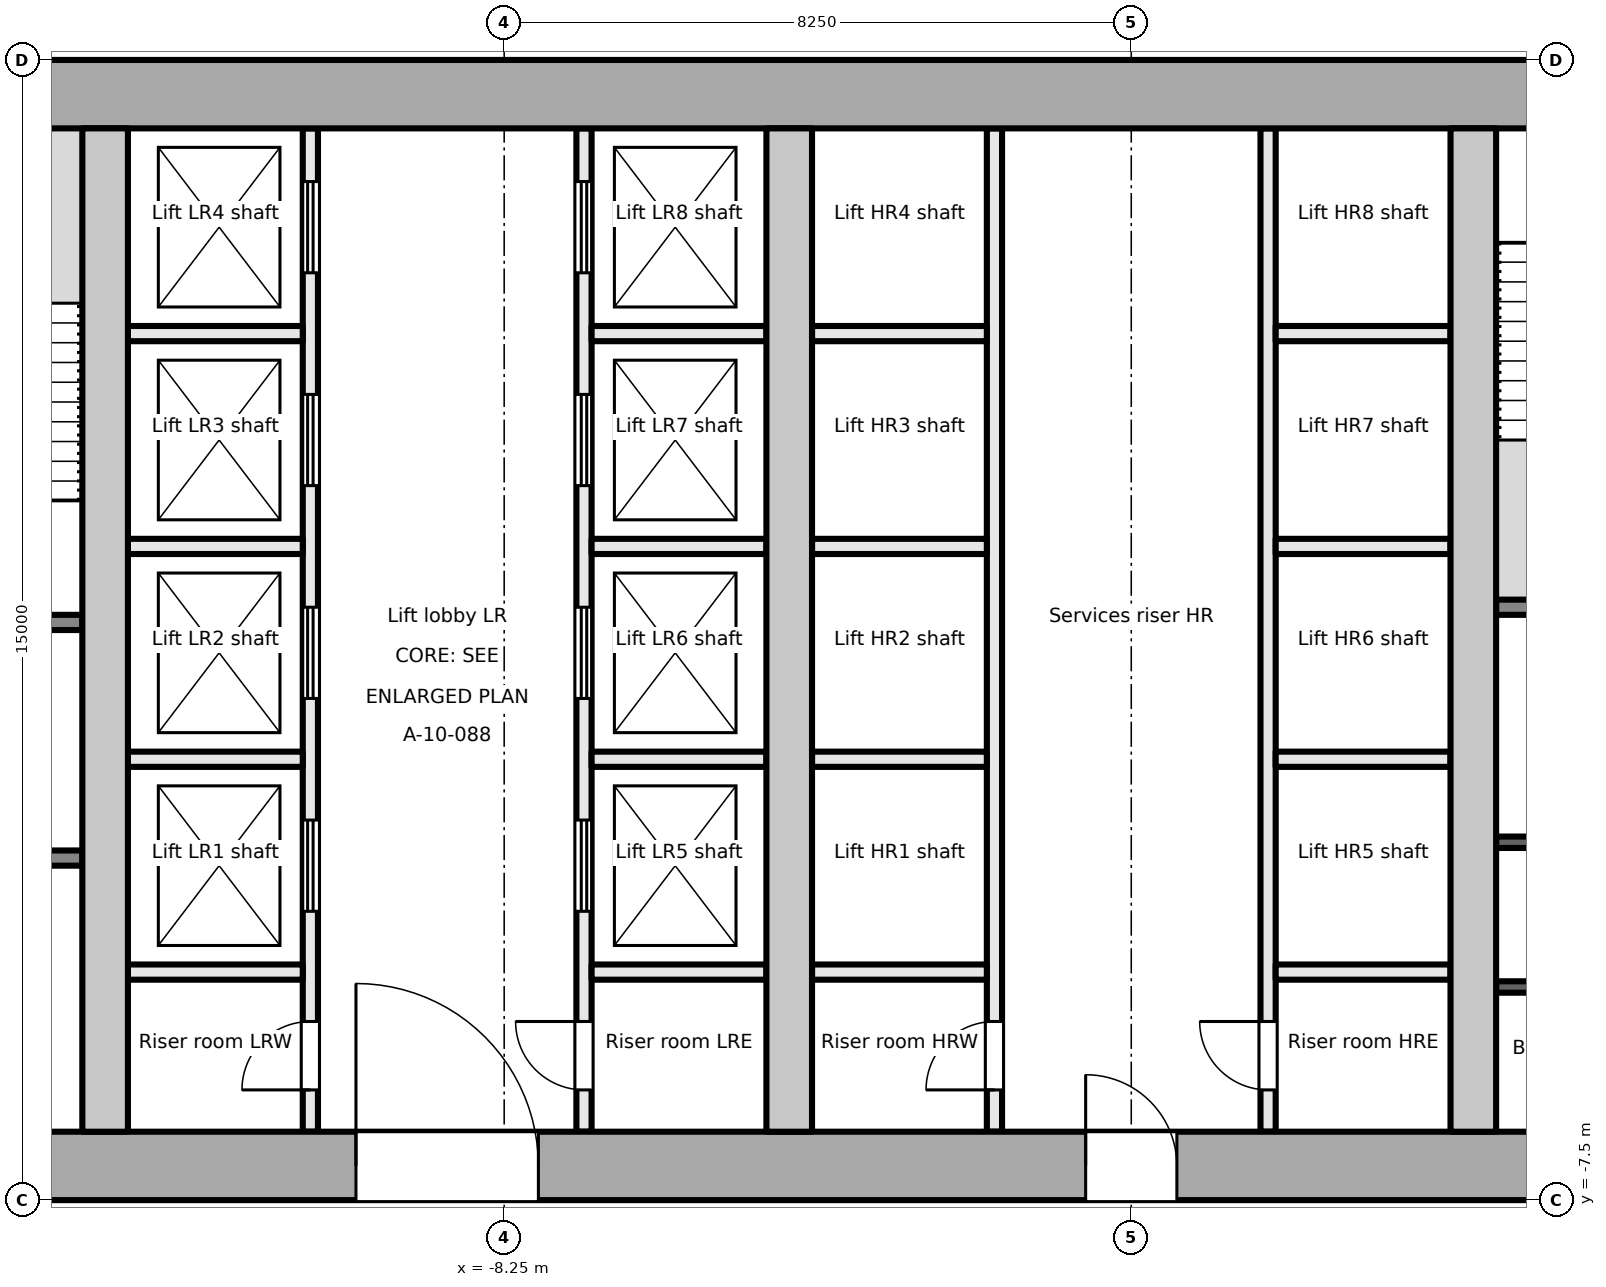
"""IFC4 building model, lengths in metres.
Left out: names, types, materials, properties, quantities, classifications, styles, units other than length and angle.
Written with IfcOpenShell. Run it as: python <this file> out.ifc"""

import sys

from ifc_helpers import new_model, si_unit, direction, frame, frame_2d, origin, place, context, subcontext, project, spatial, rectangle, extrude, element, fill, save


model = new_model("IFC4")
c1 = context("Model", 3, precision=1e-05, world=origin(), true_north=direction((0.0, 1.0)))
c2 = subcontext(c1, "Body", "Model", "MODEL_VIEW")
j1 = project(units=[si_unit("LENGTHUNIT", "METRE"), si_unit("PLANEANGLEUNIT", "RADIAN")], contexts=[c1])
p1 = place(None, origin())
s1 = spatial("IfcSite", under=j1, at=p1, CompositionType="ELEMENT")
p2 = place(p1, origin())
s2 = spatial("IfcBuilding", under=s1, at=p2, CompositionType="ELEMENT")
p3 = place(p2, frame((0.0, 0.0, 52.9)))
s3 = spatial("IfcBuildingStorey", under=s2, at=p3, CompositionType="ELEMENT", Elevation=52.9)
p4 = place(p3, frame((-18.0, -7.05, -0.2), z_axis=(0.0, 0.0, 1.0), x_axis=(1.0, 0.0, 0.0)))
e1 = element("IfcWall", 1, at=p4, inside=s3, PredefinedType="SHEAR", context=c2, shape_type="SweptSolid", body=[
    extrude(rectangle(XDim=36.0, YDim=0.9, at=frame_2d((18.0, 0.0))), origin(), (0.0, 0.0, 1.0), 4.1),
])
p5 = place(p4, frame((7.8, 0.0, 0.2)))
e2 = element("IfcOpeningElement", 2, at=p5, cuts=e1, PredefinedType="OPENING", context=c2, shape_type="SweptSolid", body=[
    extrude(rectangle(XDim=2.4, YDim=2.1, at=frame_2d((1.2, 1.05))), frame((0.0, 0.46, 0.0), z_axis=(0.0, -1.0, 0.0), x_axis=(1.0, 0.0, 0.0)), (0.0, 0.0, 1.0), 0.921),
])
p6 = place(p4, frame((17.4, 0.0, 0.2)))
e3 = element("IfcOpeningElement", 3, at=p6, cuts=e1, PredefinedType="OPENING", context=c2, shape_type="SweptSolid", body=[
    extrude(rectangle(XDim=1.2, YDim=2.1, at=frame_2d((0.6, 1.05))), frame((0.0, 0.46, 0.0), z_axis=(0.0, -1.0, 0.0), x_axis=(1.0, 0.0, 0.0)), (0.0, 0.0, 1.0), 0.921),
])
p7 = place(p4, frame((26.1, 0.0, 0.2)))
e4 = element("IfcOpeningElement", 4, at=p7, cuts=e1, PredefinedType="OPENING", context=c2, shape_type="SweptSolid", body=[
    extrude(rectangle(XDim=2.4, YDim=2.1, at=frame_2d((1.2, 1.05))), frame((0.0, 0.46, 0.0), z_axis=(0.0, -1.0, 0.0), x_axis=(1.0, 0.0, 0.0)), (0.0, 0.0, 1.0), 0.921),
])
p8 = place(p3, frame((-18.0, 7.05, -0.2), z_axis=(0.0, 0.0, 1.0), x_axis=(1.0, 0.0, 0.0)))
e5 = element("IfcWall", 5, at=p8, inside=s3, PredefinedType="SHEAR", context=c2, shape_type="SweptSolid", body=[
    extrude(rectangle(XDim=36.0, YDim=0.9, at=frame_2d((18.0, 0.0))), origin(), (0.0, 0.0, 1.0), 4.1),
])
for number, where, z_axis, x_axis in (
    (6, (-13.5, -6.6, -0.2), (0.0, 0.0, 1.0), (0.0, 1.0, 0.0)),
    (7, (-4.5, -6.6, -0.2), (0.0, 0.0, 1.0), (0.0, 1.0, 0.0)),
    (8, (4.5, -6.6, -0.2), (0.0, 0.0, 1.0), (0.0, 1.0, 0.0)),
):
    element("IfcWall", number, at=place(p3, frame(where, z_axis=z_axis, x_axis=x_axis)), inside=s3, PredefinedType="SHEAR", context=c2, shape_type="SweptSolid", body=[
        extrude(rectangle(XDim=13.2, YDim=0.6, at=frame_2d((6.6, 0.0))), origin(), (0.0, 0.0, 1.0), 4.1),
    ])
p9 = place(p3, frame((-17.1, -3.0, 0.0), z_axis=(0.0, 0.0, 1.0), x_axis=(1.0, 0.0, 0.0)))
e9 = element("IfcWall", 9, at=p9, inside=s3, PredefinedType="PARTITIONING", context=c2, shape_type="SweptSolid", body=[
    extrude(rectangle(XDim=3.3, YDim=0.2, at=frame_2d((1.65, 0.0))), origin(), (0.0, 0.0, 1.0), 3.9),
])
p10 = place(p9, frame((1.1, 0.0, 0.0)))
e10 = element("IfcOpeningElement", 10, at=p10, cuts=e9, PredefinedType="OPENING", context=c2, shape_type="SweptSolid", body=[
    extrude(rectangle(XDim=1.1, YDim=2.1, at=frame_2d((0.55, 1.05))), frame((0.0, 0.111, 0.0), z_axis=(0.0, -1.0, 0.0), x_axis=(1.0, 0.0, 0.0)), (0.0, 0.0, 1.0), 0.221),
])
p11 = place(p3, frame((-17.1, 0.1, 0.0), z_axis=(0.0, 0.0, 1.0), x_axis=(1.0, 0.0, 0.0)))
e11 = element("IfcWall", 11, at=p11, inside=s3, PredefinedType="PARTITIONING", context=c2, shape_type="SweptSolid", body=[
    extrude(rectangle(XDim=3.3, YDim=0.2, at=frame_2d((1.65, 0.0))), origin(), (0.0, 0.0, 1.0), 3.9),
])
p12 = place(p11, frame((1.1, 0.0, 0.0)))
e12 = element("IfcOpeningElement", 12, at=p12, cuts=e11, PredefinedType="OPENING", context=c2, shape_type="SweptSolid", body=[
    extrude(rectangle(XDim=1.1, YDim=2.1, at=frame_2d((0.55, 1.05))), frame((0.0, 0.111, 0.0), z_axis=(0.0, -1.0, 0.0), x_axis=(1.0, 0.0, 0.0)), (0.0, 0.0, 1.0), 0.221),
])
p13 = place(p3, frame((-10.8, -6.6, 0.0), z_axis=(0.0, 0.0, 1.0), x_axis=(0.0, 1.0, 0.0)))
e13 = element("IfcWall", 13, at=p13, inside=s3, PredefinedType="PARTITIONING", context=c2, shape_type="SweptSolid", body=[
    extrude(rectangle(XDim=13.2, YDim=0.2, at=frame_2d((6.6, 0.0))), origin(), (0.0, 0.0, 1.0), 3.9),
])
p14 = place(p13, frame((0.55, 0.0, 0.0)))
e14 = element("IfcOpeningElement", 14, at=p14, cuts=e13, PredefinedType="OPENING", context=c2, shape_type="SweptSolid", body=[
    extrude(rectangle(XDim=0.9, YDim=2.1, at=frame_2d((0.45, 1.05))), frame((0.0, 0.111, 0.0), z_axis=(0.0, -1.0, 0.0), x_axis=(1.0, 0.0, 0.0)), (0.0, 0.0, 1.0), 0.221),
])
p15 = place(p13, frame((2.9, 0.0, 0.0)))
e15 = element("IfcOpeningElement", 15, at=p15, cuts=e13, PredefinedType="OPENING", context=c2, shape_type="SweptSolid", body=[
    extrude(rectangle(XDim=1.2, YDim=2.1, at=frame_2d((0.6, 1.05))), frame((0.0, 0.111, 0.0), z_axis=(0.0, -1.0, 0.0), x_axis=(1.0, 0.0, 0.0)), (0.0, 0.0, 1.0), 0.221),
])
p16 = place(p13, frame((5.7, 0.0, 0.0)))
e16 = element("IfcOpeningElement", 16, at=p16, cuts=e13, PredefinedType="OPENING", context=c2, shape_type="SweptSolid", body=[
    extrude(rectangle(XDim=1.2, YDim=2.1, at=frame_2d((0.6, 1.05))), frame((0.0, 0.111, 0.0), z_axis=(0.0, -1.0, 0.0), x_axis=(1.0, 0.0, 0.0)), (0.0, 0.0, 1.0), 0.221),
])
p17 = place(p13, frame((8.5, 0.0, 0.0)))
e17 = element("IfcOpeningElement", 17, at=p17, cuts=e13, PredefinedType="OPENING", context=c2, shape_type="SweptSolid", body=[
    extrude(rectangle(XDim=1.2, YDim=2.1, at=frame_2d((0.6, 1.05))), frame((0.0, 0.111, 0.0), z_axis=(0.0, -1.0, 0.0), x_axis=(1.0, 0.0, 0.0)), (0.0, 0.0, 1.0), 0.221),
])
p18 = place(p13, frame((11.3, 0.0, 0.0)))
e18 = element("IfcOpeningElement", 18, at=p18, cuts=e13, PredefinedType="OPENING", context=c2, shape_type="SweptSolid", body=[
    extrude(rectangle(XDim=1.2, YDim=2.1, at=frame_2d((0.6, 1.05))), frame((0.0, 0.111, 0.0), z_axis=(0.0, -1.0, 0.0), x_axis=(1.0, 0.0, 0.0)), (0.0, 0.0, 1.0), 0.221),
])
p19 = place(p3, frame((-7.2, -6.6, 0.0), z_axis=(0.0, 0.0, 1.0), x_axis=(0.0, 1.0, 0.0)))
e19 = element("IfcWall", 19, at=p19, inside=s3, PredefinedType="PARTITIONING", context=c2, shape_type="SweptSolid", body=[
    extrude(rectangle(XDim=13.2, YDim=0.2, at=frame_2d((6.6, 0.0))), origin(), (0.0, 0.0, 1.0), 3.9),
])
p20 = place(p19, frame((0.55, 0.0, 0.0)))
e20 = element("IfcOpeningElement", 20, at=p20, cuts=e19, PredefinedType="OPENING", context=c2, shape_type="SweptSolid", body=[
    extrude(rectangle(XDim=0.9, YDim=2.1, at=frame_2d((0.45, 1.05))), frame((0.0, 0.111, 0.0), z_axis=(0.0, -1.0, 0.0), x_axis=(1.0, 0.0, 0.0)), (0.0, 0.0, 1.0), 0.221),
])
p21 = place(p19, frame((2.9, 0.0, 0.0)))
e21 = element("IfcOpeningElement", 21, at=p21, cuts=e19, PredefinedType="OPENING", context=c2, shape_type="SweptSolid", body=[
    extrude(rectangle(XDim=1.2, YDim=2.1, at=frame_2d((0.6, 1.05))), frame((0.0, 0.111, 0.0), z_axis=(0.0, -1.0, 0.0), x_axis=(1.0, 0.0, 0.0)), (0.0, 0.0, 1.0), 0.221),
])
p22 = place(p19, frame((5.7, 0.0, 0.0)))
e22 = element("IfcOpeningElement", 22, at=p22, cuts=e19, PredefinedType="OPENING", context=c2, shape_type="SweptSolid", body=[
    extrude(rectangle(XDim=1.2, YDim=2.1, at=frame_2d((0.6, 1.05))), frame((0.0, 0.111, 0.0), z_axis=(0.0, -1.0, 0.0), x_axis=(1.0, 0.0, 0.0)), (0.0, 0.0, 1.0), 0.221),
])
p23 = place(p19, frame((8.5, 0.0, 0.0)))
e23 = element("IfcOpeningElement", 23, at=p23, cuts=e19, PredefinedType="OPENING", context=c2, shape_type="SweptSolid", body=[
    extrude(rectangle(XDim=1.2, YDim=2.1, at=frame_2d((0.6, 1.05))), frame((0.0, 0.111, 0.0), z_axis=(0.0, -1.0, 0.0), x_axis=(1.0, 0.0, 0.0)), (0.0, 0.0, 1.0), 0.221),
])
p24 = place(p19, frame((11.3, 0.0, 0.0)))
e24 = element("IfcOpeningElement", 24, at=p24, cuts=e19, PredefinedType="OPENING", context=c2, shape_type="SweptSolid", body=[
    extrude(rectangle(XDim=1.2, YDim=2.1, at=frame_2d((0.6, 1.05))), frame((0.0, 0.111, 0.0), z_axis=(0.0, -1.0, 0.0), x_axis=(1.0, 0.0, 0.0)), (0.0, 0.0, 1.0), 0.221),
])
for number, where, z_axis, x_axis in (
    (25, (-13.2, -1.7, 0.0), (0.0, 0.0, 1.0), (1.0, 0.0, 0.0)),
    (26, (-13.2, 1.1, 0.0), (0.0, 0.0, 1.0), (1.0, 0.0, 0.0)),
    (27, (-13.2, 3.9, 0.0), (0.0, 0.0, 1.0), (1.0, 0.0, 0.0)),
    (28, (-13.2, -4.5, 0.0), (0.0, 0.0, 1.0), (1.0, 0.0, 0.0)),
    (29, (-7.1, -1.7, 0.0), (0.0, 0.0, 1.0), (1.0, 0.0, 0.0)),
    (30, (-7.1, 1.1, 0.0), (0.0, 0.0, 1.0), (1.0, 0.0, 0.0)),
    (31, (-7.1, 3.9, 0.0), (0.0, 0.0, 1.0), (1.0, 0.0, 0.0)),
    (32, (-7.1, -4.5, 0.0), (0.0, 0.0, 1.0), (1.0, 0.0, 0.0)),
):
    element("IfcWall", number, at=place(p3, frame(where, z_axis=z_axis, x_axis=x_axis)), inside=s3, PredefinedType="PARTITIONING", context=c2, shape_type="SweptSolid", body=[
        extrude(rectangle(XDim=2.3, YDim=0.2, at=frame_2d((1.15, 0.0))), origin(), (0.0, 0.0, 1.0), 3.9),
    ])
p25 = place(p3, frame((-1.8, -6.6, 0.0), z_axis=(0.0, 0.0, 1.0), x_axis=(0.0, 1.0, 0.0)))
e33 = element("IfcWall", 33, at=p25, inside=s3, PredefinedType="PARTITIONING", context=c2, shape_type="SweptSolid", body=[
    extrude(rectangle(XDim=13.2, YDim=0.2, at=frame_2d((6.6, 0.0))), origin(), (0.0, 0.0, 1.0), 3.9),
])
p26 = place(p25, frame((0.55, 0.0, 0.0)))
e34 = element("IfcOpeningElement", 34, at=p26, cuts=e33, PredefinedType="OPENING", context=c2, shape_type="SweptSolid", body=[
    extrude(rectangle(XDim=0.9, YDim=2.1, at=frame_2d((0.45, 1.05))), frame((0.0, 0.111, 0.0), z_axis=(0.0, -1.0, 0.0), x_axis=(1.0, 0.0, 0.0)), (0.0, 0.0, 1.0), 0.221),
])
p27 = place(p3, frame((1.8, -6.6, 0.0), z_axis=(0.0, 0.0, 1.0), x_axis=(0.0, 1.0, 0.0)))
e35 = element("IfcWall", 35, at=p27, inside=s3, PredefinedType="PARTITIONING", context=c2, shape_type="SweptSolid", body=[
    extrude(rectangle(XDim=13.2, YDim=0.2, at=frame_2d((6.6, 0.0))), origin(), (0.0, 0.0, 1.0), 3.9),
])
p28 = place(p27, frame((0.55, 0.0, 0.0)))
e36 = element("IfcOpeningElement", 36, at=p28, cuts=e35, PredefinedType="OPENING", context=c2, shape_type="SweptSolid", body=[
    extrude(rectangle(XDim=0.9, YDim=2.1, at=frame_2d((0.45, 1.05))), frame((0.0, 0.111, 0.0), z_axis=(0.0, -1.0, 0.0), x_axis=(1.0, 0.0, 0.0)), (0.0, 0.0, 1.0), 0.221),
])
for number, where, z_axis, x_axis in (
    (37, (-4.2, -1.7, 0.0), (0.0, 0.0, 1.0), (1.0, 0.0, 0.0)),
    (38, (-4.2, 1.1, 0.0), (0.0, 0.0, 1.0), (1.0, 0.0, 0.0)),
    (39, (-4.2, 3.9, 0.0), (0.0, 0.0, 1.0), (1.0, 0.0, 0.0)),
    (40, (-4.2, -4.5, 0.0), (0.0, 0.0, 1.0), (1.0, 0.0, 0.0)),
    (41, (1.9, -1.7, 0.0), (0.0, 0.0, 1.0), (1.0, 0.0, 0.0)),
    (42, (1.9, 1.1, 0.0), (0.0, 0.0, 1.0), (1.0, 0.0, 0.0)),
    (43, (1.9, 3.9, 0.0), (0.0, 0.0, 1.0), (1.0, 0.0, 0.0)),
    (44, (1.9, -4.5, 0.0), (0.0, 0.0, 1.0), (1.0, 0.0, 0.0)),
):
    element("IfcWall", number, at=place(p3, frame(where, z_axis=z_axis, x_axis=x_axis)), inside=s3, PredefinedType="PARTITIONING", context=c2, shape_type="SweptSolid", body=[
        extrude(rectangle(XDim=2.3, YDim=0.2, at=frame_2d((1.15, 0.0))), origin(), (0.0, 0.0, 1.0), 3.9),
    ])
p29 = place(p3, frame((4.8, 0.3, 0.0), z_axis=(0.0, 0.0, 1.0), x_axis=(1.0, 0.0, 0.0)))
e45 = element("IfcWall", 45, at=p29, inside=s3, PredefinedType="PARTITIONING", context=c2, shape_type="SweptSolid", body=[
    extrude(rectangle(XDim=3.15, YDim=0.2, at=frame_2d((1.575, 0.0))), origin(), (0.0, 0.0, 1.0), 3.9),
])
for number, where, z_axis, x_axis in (
    (46, (4.8, -4.696, 0.0), (0.0, 0.0, 1.0), (1.0, 0.0, 0.0)),
    (47, (4.8, -2.792, 0.0), (0.0, 0.0, 1.0), (1.0, 0.0, 0.0)),
):
    element("IfcWall", number, at=place(p3, frame(where, z_axis=z_axis, x_axis=x_axis)), inside=s3, PredefinedType="PARTITIONING", context=c2, shape_type="SweptSolid", body=[
        extrude(rectangle(XDim=3.15, YDim=0.15, at=frame_2d((1.575, 0.0))), origin(), (0.0, 0.0, 1.0), 3.9),
    ])
p30 = place(p14, origin())
e48 = element("IfcDoor", 48, at=p30, inside=s3, OperationType="SINGLE_SWING_LEFT", PredefinedType="DOOR", context=c2, shape_type="SweptSolid", body=[
    extrude(rectangle(XDim=0.9, YDim=2.1, at=frame_2d((0.45, 1.05))), frame((0.0, 0.025, 0.0), z_axis=(0.0, -1.0, 0.0), x_axis=(1.0, 0.0, 0.0)), (0.0, 0.0, 1.0), 0.05),
])
fill(e14, e48)
p31 = place(p15, origin())
e49 = element("IfcDoor", 49, at=p31, inside=s3, OperationType="DOUBLE_DOOR_SLIDING", PredefinedType="DOOR", context=c2, shape_type="SweptSolid", body=[
    extrude(rectangle(XDim=1.2, YDim=2.1, at=frame_2d((0.6, 1.05))), frame((0.0, 0.025, 0.0), z_axis=(0.0, -1.0, 0.0), x_axis=(1.0, 0.0, 0.0)), (0.0, 0.0, 1.0), 0.05),
])
fill(e15, e49)
p32 = place(p16, origin())
e50 = element("IfcDoor", 50, at=p32, inside=s3, OperationType="DOUBLE_DOOR_SLIDING", PredefinedType="DOOR", context=c2, shape_type="SweptSolid", body=[
    extrude(rectangle(XDim=1.2, YDim=2.1, at=frame_2d((0.6, 1.05))), frame((0.0, 0.025, 0.0), z_axis=(0.0, -1.0, 0.0), x_axis=(1.0, 0.0, 0.0)), (0.0, 0.0, 1.0), 0.05),
])
fill(e16, e50)
p33 = place(p17, origin())
e51 = element("IfcDoor", 51, at=p33, inside=s3, OperationType="DOUBLE_DOOR_SLIDING", PredefinedType="DOOR", context=c2, shape_type="SweptSolid", body=[
    extrude(rectangle(XDim=1.2, YDim=2.1, at=frame_2d((0.6, 1.05))), frame((0.0, 0.025, 0.0), z_axis=(0.0, -1.0, 0.0), x_axis=(1.0, 0.0, 0.0)), (0.0, 0.0, 1.0), 0.05),
])
fill(e17, e51)
p34 = place(p18, origin())
e52 = element("IfcDoor", 52, at=p34, inside=s3, OperationType="DOUBLE_DOOR_SLIDING", PredefinedType="DOOR", context=c2, shape_type="SweptSolid", body=[
    extrude(rectangle(XDim=1.2, YDim=2.1, at=frame_2d((0.6, 1.05))), frame((0.0, 0.025, 0.0), z_axis=(0.0, -1.0, 0.0), x_axis=(1.0, 0.0, 0.0)), (0.0, 0.0, 1.0), 0.05),
])
fill(e18, e52)
p35 = place(p20, origin())
e53 = element("IfcDoor", 53, at=p35, inside=s3, OperationType="SINGLE_SWING_RIGHT", PredefinedType="DOOR", context=c2, shape_type="SweptSolid", body=[
    extrude(rectangle(XDim=0.9, YDim=2.1, at=frame_2d((0.45, 1.05))), frame((0.0, 0.025, 0.0), z_axis=(0.0, -1.0, 0.0), x_axis=(1.0, 0.0, 0.0)), (0.0, 0.0, 1.0), 0.05),
])
fill(e20, e53)
p36 = place(p21, origin())
e54 = element("IfcDoor", 54, at=p36, inside=s3, OperationType="DOUBLE_DOOR_SLIDING", PredefinedType="DOOR", context=c2, shape_type="SweptSolid", body=[
    extrude(rectangle(XDim=1.2, YDim=2.1, at=frame_2d((0.6, 1.05))), frame((0.0, 0.025, 0.0), z_axis=(0.0, -1.0, 0.0), x_axis=(1.0, 0.0, 0.0)), (0.0, 0.0, 1.0), 0.05),
])
fill(e21, e54)
p37 = place(p22, origin())
e55 = element("IfcDoor", 55, at=p37, inside=s3, OperationType="DOUBLE_DOOR_SLIDING", PredefinedType="DOOR", context=c2, shape_type="SweptSolid", body=[
    extrude(rectangle(XDim=1.2, YDim=2.1, at=frame_2d((0.6, 1.05))), frame((0.0, 0.025, 0.0), z_axis=(0.0, -1.0, 0.0), x_axis=(1.0, 0.0, 0.0)), (0.0, 0.0, 1.0), 0.05),
])
fill(e22, e55)
p38 = place(p23, origin())
e56 = element("IfcDoor", 56, at=p38, inside=s3, OperationType="DOUBLE_DOOR_SLIDING", PredefinedType="DOOR", context=c2, shape_type="SweptSolid", body=[
    extrude(rectangle(XDim=1.2, YDim=2.1, at=frame_2d((0.6, 1.05))), frame((0.0, 0.025, 0.0), z_axis=(0.0, -1.0, 0.0), x_axis=(1.0, 0.0, 0.0)), (0.0, 0.0, 1.0), 0.05),
])
fill(e23, e56)
p39 = place(p24, origin())
e57 = element("IfcDoor", 57, at=p39, inside=s3, OperationType="DOUBLE_DOOR_SLIDING", PredefinedType="DOOR", context=c2, shape_type="SweptSolid", body=[
    extrude(rectangle(XDim=1.2, YDim=2.1, at=frame_2d((0.6, 1.05))), frame((0.0, 0.025, 0.0), z_axis=(0.0, -1.0, 0.0), x_axis=(1.0, 0.0, 0.0)), (0.0, 0.0, 1.0), 0.05),
])
fill(e24, e57)
p40 = place(p5, origin())
e58 = element("IfcDoor", 58, at=p40, inside=s3, OperationType="DOUBLE_DOOR_DOUBLE_SWING", PredefinedType="DOOR", context=c2, shape_type="SweptSolid", body=[
    extrude(rectangle(XDim=2.4, YDim=2.1, at=frame_2d((1.2, 1.05))), frame((0.0, 0.025, 0.0), z_axis=(0.0, -1.0, 0.0), x_axis=(1.0, 0.0, 0.0)), (0.0, 0.0, 1.0), 0.05),
])
fill(e2, e58)
p41 = place(p26, origin())
e59 = element("IfcDoor", 59, at=p41, inside=s3, OperationType="SINGLE_SWING_LEFT", PredefinedType="DOOR", context=c2, shape_type="SweptSolid", body=[
    extrude(rectangle(XDim=0.9, YDim=2.1, at=frame_2d((0.45, 1.05))), frame((0.0, 0.025, 0.0), z_axis=(0.0, -1.0, 0.0), x_axis=(1.0, 0.0, 0.0)), (0.0, 0.0, 1.0), 0.05),
])
fill(e34, e59)
p42 = place(p28, origin())
e60 = element("IfcDoor", 60, at=p42, inside=s3, OperationType="SINGLE_SWING_RIGHT", PredefinedType="DOOR", context=c2, shape_type="SweptSolid", body=[
    extrude(rectangle(XDim=0.9, YDim=2.1, at=frame_2d((0.45, 1.05))), frame((0.0, 0.025, 0.0), z_axis=(0.0, -1.0, 0.0), x_axis=(1.0, 0.0, 0.0)), (0.0, 0.0, 1.0), 0.05),
])
fill(e36, e60)
p43 = place(p6, origin())
e61 = element("IfcDoor", 61, at=p43, inside=s3, OperationType="SINGLE_SWING_LEFT", PredefinedType="DOOR", context=c2, shape_type="SweptSolid", body=[
    extrude(rectangle(XDim=1.2, YDim=2.1, at=frame_2d((0.6, 1.05))), frame((0.0, 0.025, 0.0), z_axis=(0.0, -1.0, 0.0), x_axis=(1.0, 0.0, 0.0)), (0.0, 0.0, 1.0), 0.05),
])
fill(e3, e61)
save(model, sys.argv[1])
